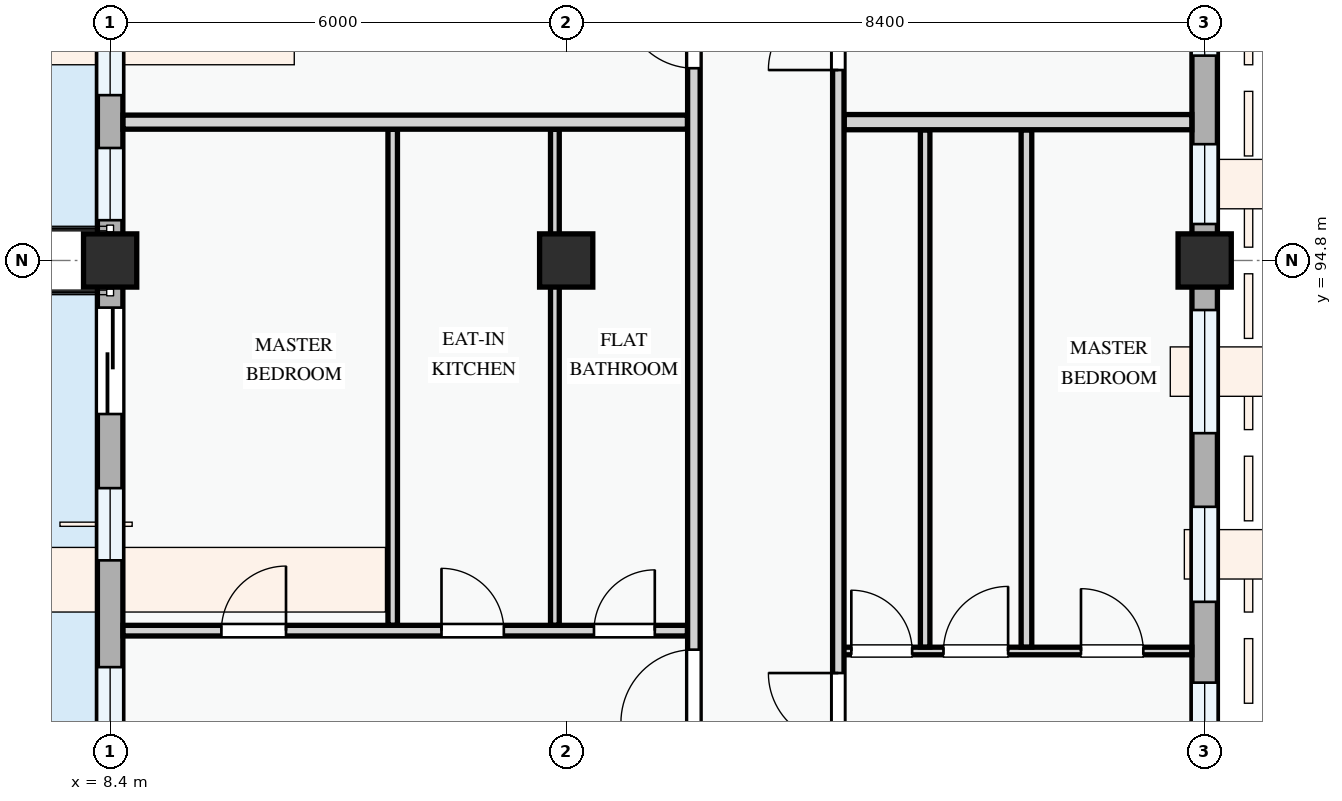
"""IFC4 building model, lengths in metres.
Left out: names, types, materials, properties, quantities, classifications, styles, units other than length and angle.
Written with IfcOpenShell. Run it as: python <this file> out.ifc"""

import sys

from ifc_helpers import new_model, si_unit, direction, frame, frame_2d, origin, origin_2d, place, context, subcontext, project, spatial, rectangle, extrude, element, fill, save


model = new_model("IFC4")
c1 = context("Model", 3, precision=1e-05, world=origin(), true_north=direction((0.0, 1.0)))
c2 = subcontext(c1, "Body", "Model", "MODEL_VIEW")
j1 = project(units=[si_unit("LENGTHUNIT", "METRE"), si_unit("PLANEANGLEUNIT", "RADIAN")], contexts=[c1])
p1 = place(None, origin())
s1 = spatial("IfcSite", under=j1, at=p1, CompositionType="ELEMENT")
p2 = place(p1, origin())
s2 = spatial("IfcBuilding", under=s1, at=p2, CompositionType="ELEMENT")
p3 = place(p2, frame((0.0, 0.0, 18.0)))
s3 = spatial("IfcBuildingStorey", under=s2, at=p3, CompositionType="ELEMENT", Elevation=18.0)
for number, where, z_axis, x_axis in (
    (1, (8.4, 94.8, 0.0), (0.0, 0.0, 1.0), (1.0, 0.0, 0.0)),
    (2, (14.4, 94.8, 0.0), (0.0, 0.0, 1.0), (1.0, 0.0, 0.0)),
    (3, (22.8, 94.8, 0.0), (0.0, 0.0, 1.0), (1.0, 0.0, 0.0)),
):
    element("IfcColumn", number, at=place(p3, frame(where, z_axis=z_axis, x_axis=x_axis)), inside=s3, PredefinedType="COLUMN", context=c2, shape_type="SweptSolid", body=[
        extrude(rectangle(XDim=0.7, YDim=0.7, at=origin_2d()), origin(), (0.0, 0.0, 1.0), 3.3),
    ])
p4 = place(p3, frame((8.4, 100.8, 0.0), z_axis=(0.0, 0.0, 1.0), x_axis=(0.0, -1.0, 0.0)))
e4 = element("IfcWall", 4, at=p4, inside=s3, PredefinedType="STANDARD", context=c2, shape_type="SweptSolid", body=[
    extrude(rectangle(XDim=6.0, YDim=0.335, at=frame_2d((3.0, 0.0))), origin(), (0.0, 0.0, 1.0), 2.575),
])
p5 = place(p4, frame((0.62, 0.0, 0.0)))
e5 = element("IfcOpeningElement", 5, at=p5, cuts=e4, PredefinedType="OPENING", context=c2, shape_type="SweptSolid", body=[
    extrude(rectangle(XDim=1.3, YDim=2.15, at=frame_2d((0.65, 1.075))), frame((0.0, 0.177, 0.0), z_axis=(0.0, -1.0, 0.0), x_axis=(1.0, 0.0, 0.0)), (0.0, 0.0, 1.0), 0.355),
])
p6 = place(p4, frame((2.325, 0.0, 0.78)))
e6 = element("IfcOpeningElement", 6, at=p6, cuts=e4, PredefinedType="OPENING", context=c2, shape_type="SweptSolid", body=[
    extrude(rectangle(XDim=1.5, YDim=1.5, at=frame_2d((0.75, 0.75))), frame((0.0, 0.177, 0.0), z_axis=(0.0, -1.0, 0.0), x_axis=(1.0, 0.0, 0.0)), (0.0, 0.0, 1.0), 0.355),
])
p7 = place(p4, frame((4.52, 0.0, 0.78)))
e7 = element("IfcOpeningElement", 7, at=p7, cuts=e4, PredefinedType="OPENING", context=c2, shape_type="SweptSolid", body=[
    extrude(rectangle(XDim=0.95, YDim=1.15, at=frame_2d((0.475, 0.575))), frame((0.0, 0.177, 0.0), z_axis=(0.0, -1.0, 0.0), x_axis=(1.0, 0.0, 0.0)), (0.0, 0.0, 1.0), 0.355),
])
p8 = place(p3, frame((8.4, 94.8, 0.0), z_axis=(0.0, 0.0, 1.0), x_axis=(0.0, -1.0, 0.0)))
e8 = element("IfcWall", 8, at=p8, inside=s3, PredefinedType="STANDARD", context=c2, shape_type="SweptSolid", body=[
    extrude(rectangle(XDim=8.4, YDim=0.335, at=frame_2d((4.2, 0.0))), origin(), (0.0, 0.0, 1.0), 2.425),
])
p9 = place(p8, frame((0.62, 0.0, 0.0)))
e9 = element("IfcOpeningElement", 9, at=p9, cuts=e8, PredefinedType="OPENING", context=c2, shape_type="SweptSolid", body=[
    extrude(rectangle(XDim=1.4, YDim=2.2, at=frame_2d((0.7, 1.1))), frame((0.0, 0.177, 0.0), z_axis=(0.0, -1.0, 0.0), x_axis=(1.0, 0.0, 0.0)), (0.0, 0.0, 1.0), 0.355),
])
p10 = place(p8, frame((2.995, 0.0, 0.78)))
e10 = element("IfcOpeningElement", 10, at=p10, cuts=e8, PredefinedType="OPENING", context=c2, shape_type="SweptSolid", body=[
    extrude(rectangle(XDim=0.95, YDim=1.15, at=frame_2d((0.475, 0.575))), frame((0.0, 0.177, 0.0), z_axis=(0.0, -1.0, 0.0), x_axis=(1.0, 0.0, 0.0)), (0.0, 0.0, 1.0), 0.355),
])
p11 = place(p8, frame((5.35, 0.0, 0.78)))
e11 = element("IfcOpeningElement", 11, at=p11, cuts=e8, PredefinedType="OPENING", context=c2, shape_type="SweptSolid", body=[
    extrude(rectangle(XDim=2.38, YDim=1.48, at=frame_2d((1.19, 0.74))), frame((0.0, 0.177, 0.0), z_axis=(0.0, -1.0, 0.0), x_axis=(1.0, 0.0, 0.0)), (0.0, 0.0, 1.0), 0.355),
])
p12 = place(p3, frame((22.8, 86.4, 0.0), z_axis=(0.0, 0.0, 1.0), x_axis=(0.0, 1.0, 0.0)))
e12 = element("IfcWall", 12, at=p12, inside=s3, PredefinedType="STANDARD", context=c2, shape_type="SweptSolid", body=[
    extrude(rectangle(XDim=8.4, YDim=0.335, at=frame_2d((4.2, 0.0))), origin(), (0.0, 0.0, 1.0), 2.425),
])
p13 = place(p12, frame((0.606, 0.0, 0.78)))
e13 = element("IfcOpeningElement", 13, at=p13, cuts=e12, PredefinedType="OPENING", context=c2, shape_type="SweptSolid", body=[
    extrude(rectangle(XDim=2.24, YDim=1.52, at=frame_2d((1.12, 0.76))), frame((0.0, 0.177, 0.0), z_axis=(0.0, -1.0, 0.0), x_axis=(1.0, 0.0, 0.0)), (0.0, 0.0, 1.0), 0.355),
])
p14 = place(p12, frame((3.909, 0.0, 0.78)))
e14 = element("IfcOpeningElement", 14, at=p14, cuts=e12, PredefinedType="OPENING", context=c2, shape_type="SweptSolid", body=[
    extrude(rectangle(XDim=1.25, YDim=1.45, at=frame_2d((0.625, 0.725))), frame((0.0, 0.177, 0.0), z_axis=(0.0, -1.0, 0.0), x_axis=(1.0, 0.0, 0.0)), (0.0, 0.0, 1.0), 0.355),
])
p15 = place(p12, frame((6.128, 0.0, 0.78)))
e15 = element("IfcOpeningElement", 15, at=p15, cuts=e12, PredefinedType="OPENING", context=c2, shape_type="SweptSolid", body=[
    extrude(rectangle(XDim=1.62, YDim=1.38, at=frame_2d((0.81, 0.69))), frame((0.0, 0.177, 0.0), z_axis=(0.0, -1.0, 0.0), x_axis=(1.0, 0.0, 0.0)), (0.0, 0.0, 1.0), 0.355),
])
p16 = place(p3, frame((22.8, 94.8, 0.0), z_axis=(0.0, 0.0, 1.0), x_axis=(0.0, 1.0, 0.0)))
e16 = element("IfcWall", 16, at=p16, inside=s3, PredefinedType="STANDARD", context=c2, shape_type="SweptSolid", body=[
    extrude(rectangle(XDim=6.0, YDim=0.335, at=frame_2d((3.0, 0.0))), origin(), (0.0, 0.0, 1.0), 2.575),
])
p17 = place(p16, frame((0.48, 0.0, 0.78)))
e17 = element("IfcOpeningElement", 17, at=p17, cuts=e16, PredefinedType="OPENING", context=c2, shape_type="SweptSolid", body=[
    extrude(rectangle(XDim=1.05, YDim=1.2, at=frame_2d((0.525, 0.6))), frame((0.0, 0.177, 0.0), z_axis=(0.0, -1.0, 0.0), x_axis=(1.0, 0.0, 0.0)), (0.0, 0.0, 1.0), 0.355),
])
p18 = place(p16, frame((2.695, 0.0, 0.78)))
e18 = element("IfcOpeningElement", 18, at=p18, cuts=e16, PredefinedType="OPENING", context=c2, shape_type="SweptSolid", body=[
    extrude(rectangle(XDim=2.24, YDim=1.52, at=frame_2d((1.12, 0.76))), frame((0.0, 0.177, 0.0), z_axis=(0.0, -1.0, 0.0), x_axis=(1.0, 0.0, 0.0)), (0.0, 0.0, 1.0), 0.355),
])
p19 = place(p3, frame((8.57, 89.93, 0.0), z_axis=(0.0, 0.0, 1.0), x_axis=(1.0, 0.0, 0.0)))
e19 = element("IfcWall", 19, at=p19, inside=s3, PredefinedType="PARTITIONING", context=c2, shape_type="SweptSolid", body=[
    extrude(rectangle(XDim=7.426, YDim=0.14, at=frame_2d((3.713, 0.0))), origin(), (0.0, 0.0, 1.0), 3.0),
])
p20 = place(p19, frame((1.294, 0.0, 0.0)))
e20 = element("IfcOpeningElement", 20, at=p20, cuts=e19, PredefinedType="OPENING", context=c2, shape_type="SweptSolid", body=[
    extrude(rectangle(XDim=0.85, YDim=2.1, at=frame_2d((0.425, 1.05))), frame((0.0, 0.08, 0.0), z_axis=(0.0, -1.0, 0.0), x_axis=(1.0, 0.0, 0.0)), (0.0, 0.0, 1.0), 0.16),
])
p21 = place(p19, frame((4.19, 0.0, 0.0)))
e21 = element("IfcOpeningElement", 21, at=p21, cuts=e19, PredefinedType="OPENING", context=c2, shape_type="SweptSolid", body=[
    extrude(rectangle(XDim=0.82, YDim=2.08, at=frame_2d((0.41, 1.04))), frame((0.0, 0.08, 0.0), z_axis=(0.0, -1.0, 0.0), x_axis=(1.0, 0.0, 0.0)), (0.0, 0.0, 1.0), 0.16),
])
p22 = place(p19, frame((6.196, 0.0, 0.0)))
e22 = element("IfcOpeningElement", 22, at=p22, cuts=e19, PredefinedType="OPENING", context=c2, shape_type="SweptSolid", body=[
    extrude(rectangle(XDim=0.8, YDim=2.1, at=frame_2d((0.4, 1.05))), frame((0.0, 0.08, 0.0), z_axis=(0.0, -1.0, 0.0), x_axis=(1.0, 0.0, 0.0)), (0.0, 0.0, 1.0), 0.16),
])
p23 = place(p3, frame((12.118, 90.002, 0.0), z_axis=(0.0, 0.0, 1.0), x_axis=(0.0, 1.0, 0.0)))
e23 = element("IfcWall", 23, at=p23, inside=s3, PredefinedType="PARTITIONING", context=c2, shape_type="SweptSolid", body=[
    extrude(rectangle(XDim=6.523, YDim=0.125, at=frame_2d((3.262, 0.0))), origin(), (0.0, 0.0, 1.0), 3.0),
])
p24 = place(p3, frame((14.251, 90.002, 0.0), z_axis=(0.0, 0.0, 1.0), x_axis=(0.0, 1.0, 0.0)))
e24 = element("IfcWall", 24, at=p24, inside=s3, PredefinedType="PARTITIONING", context=c2, shape_type="SweptSolid", body=[
    extrude(rectangle(XDim=6.523, YDim=0.115, at=frame_2d((3.262, 0.0))), origin(), (0.0, 0.0, 1.0), 2.425),
])
p25 = place(p3, frame((17.98, 89.662, 0.0), z_axis=(0.0, 0.0, 1.0), x_axis=(1.0, 0.0, 0.0)))
e25 = element("IfcWall", 25, at=p25, inside=s3, PredefinedType="PARTITIONING", context=c2, shape_type="SweptSolid", body=[
    extrude(rectangle(XDim=4.651, YDim=0.1, at=frame_2d((2.325, 0.0))), origin(), (0.0, 0.0, 1.0), 3.0),
])
p26 = place(p25, frame((0.171, 0.0, 0.0)))
e26 = element("IfcOpeningElement", 26, at=p26, cuts=e25, PredefinedType="OPENING", context=c2, shape_type="SweptSolid", body=[
    extrude(rectangle(XDim=0.8, YDim=2.1, at=frame_2d((0.4, 1.05))), frame((0.0, 0.06, 0.0), z_axis=(0.0, -1.0, 0.0), x_axis=(1.0, 0.0, 0.0)), (0.0, 0.0, 1.0), 0.12),
])
p27 = place(p25, frame((1.384, 0.0, 0.0)))
e27 = element("IfcOpeningElement", 27, at=p27, cuts=e25, PredefinedType="OPENING", context=c2, shape_type="SweptSolid", body=[
    extrude(rectangle(XDim=0.85, YDim=2.1, at=frame_2d((0.425, 1.05))), frame((0.0, 0.06, 0.0), z_axis=(0.0, -1.0, 0.0), x_axis=(1.0, 0.0, 0.0)), (0.0, 0.0, 1.0), 0.12),
])
p28 = place(p25, frame((3.193, 0.0, 0.0)))
e28 = element("IfcOpeningElement", 28, at=p28, cuts=e25, PredefinedType="OPENING", context=c2, shape_type="SweptSolid", body=[
    extrude(rectangle(XDim=0.82, YDim=2.08, at=frame_2d((0.41, 1.04))), frame((0.0, 0.06, 0.0), z_axis=(0.0, -1.0, 0.0), x_axis=(1.0, 0.0, 0.0)), (0.0, 0.0, 1.0), 0.12),
])
p29 = place(p3, frame((20.455, 89.714, 0.0), z_axis=(0.0, 0.0, 1.0), x_axis=(0.0, 1.0, 0.0)))
e29 = element("IfcWall", 29, at=p29, inside=s3, PredefinedType="PARTITIONING", context=c2, shape_type="SweptSolid", body=[
    extrude(rectangle(XDim=6.804, YDim=0.14, at=frame_2d((3.402, 0.0))), origin(), (0.0, 0.0, 1.0), 3.0),
])
p30 = place(p3, frame((19.122, 89.714, 0.0), z_axis=(0.0, 0.0, 1.0), x_axis=(0.0, 1.0, 0.0)))
e30 = element("IfcWall", 30, at=p30, inside=s3, PredefinedType="PARTITIONING", context=c2, shape_type="SweptSolid", body=[
    extrude(rectangle(XDim=6.804, YDim=0.125, at=frame_2d((3.402, 0.0))), origin(), (0.0, 0.0, 1.0), 3.0),
])
p31 = place(p3, frame((8.57, 96.62, 0.0), z_axis=(0.0, 0.0, 1.0), x_axis=(1.0, 0.0, 0.0)))
e31 = element("IfcWall", 31, at=p31, inside=s3, PredefinedType="PARTITIONING", context=c2, shape_type="SweptSolid", body=[
    extrude(rectangle(XDim=7.426, YDim=0.185, at=frame_2d((3.713, 0.0))), origin(), (0.0, 0.0, 1.0), 3.0),
])
p32 = place(p3, frame((18.057, 96.62, 0.0), z_axis=(0.0, 0.0, 1.0), x_axis=(1.0, 0.0, 0.0)))
e32 = element("IfcWall", 32, at=p32, inside=s3, PredefinedType="PARTITIONING", context=c2, shape_type="SweptSolid", body=[
    extrude(rectangle(XDim=4.574, YDim=0.2, at=frame_2d((2.287, 0.0))), origin(), (0.0, 0.0, 1.0), 3.0),
])
p33 = place(p3, frame((16.08, 72.06, 0.0), z_axis=(0.0, 0.0, 1.0), x_axis=(0.0, 1.0, 0.0)))
e33 = element("IfcWall", 33, at=p33, inside=s3, PredefinedType="PARTITIONING", context=c2, shape_type="SweptSolid", body=[
    extrude(rectangle(XDim=37.28, YDim=0.165, at=frame_2d((18.64, 0.0))), origin(), (0.0, 0.0, 1.0), 3.0),
])
p34 = place(p33, frame((3.606, 0.0, 0.0)))
e34 = element("IfcOpeningElement", 34, at=p34, cuts=e33, PredefinedType="OPENING", context=c2, shape_type="SweptSolid", body=[
    extrude(rectangle(XDim=0.92, YDim=2.1, at=frame_2d((0.46, 1.05))), frame((0.0, 0.093, 0.0), z_axis=(0.0, -1.0, 0.0), x_axis=(1.0, 0.0, 0.0)), (0.0, 0.0, 1.0), 0.185),
])
p35 = place(p33, frame((16.66, 0.0, 0.0)))
e35 = element("IfcOpeningElement", 35, at=p35, cuts=e33, PredefinedType="OPENING", context=c2, shape_type="SweptSolid", body=[
    extrude(rectangle(XDim=0.96, YDim=2.12, at=frame_2d((0.48, 1.06))), frame((0.0, 0.093, 0.0), z_axis=(0.0, -1.0, 0.0), x_axis=(1.0, 0.0, 0.0)), (0.0, 0.0, 1.0), 0.185),
])
p36 = place(p33, frame((25.269, 0.0, 0.0)))
e36 = element("IfcOpeningElement", 36, at=p36, cuts=e33, PredefinedType="OPENING", context=c2, shape_type="SweptSolid", body=[
    extrude(rectangle(XDim=0.92, YDim=2.1, at=frame_2d((0.46, 1.05))), frame((0.0, 0.093, 0.0), z_axis=(0.0, -1.0, 0.0), x_axis=(1.0, 0.0, 0.0)), (0.0, 0.0, 1.0), 0.185),
])
p37 = place(p3, frame((17.98, 72.06, 0.0), z_axis=(0.0, 0.0, 1.0), x_axis=(0.0, 1.0, 0.0)))
e37 = element("IfcWall", 37, at=p37, inside=s3, PredefinedType="PARTITIONING", context=c2, shape_type="SweptSolid", body=[
    extrude(rectangle(XDim=37.28, YDim=0.15, at=frame_2d((18.64, 0.0))), origin(), (0.0, 0.0, 1.0), 3.0),
])
p38 = place(p37, frame((3.668, 0.0, 0.0)))
e38 = element("IfcOpeningElement", 38, at=p38, cuts=e37, PredefinedType="OPENING", context=c2, shape_type="SweptSolid", body=[
    extrude(rectangle(XDim=0.92, YDim=2.1, at=frame_2d((0.46, 1.05))), frame((0.0, 0.085, 0.0), z_axis=(0.0, -1.0, 0.0), x_axis=(1.0, 0.0, 0.0)), (0.0, 0.0, 1.0), 0.17),
])
p39 = place(p37, frame((16.392, 0.0, 0.0)))
e39 = element("IfcOpeningElement", 39, at=p39, cuts=e37, PredefinedType="OPENING", context=c2, shape_type="SweptSolid", body=[
    extrude(rectangle(XDim=0.92, YDim=2.1, at=frame_2d((0.46, 1.05))), frame((0.0, 0.085, 0.0), z_axis=(0.0, -1.0, 0.0), x_axis=(1.0, 0.0, 0.0)), (0.0, 0.0, 1.0), 0.17),
])
p40 = place(p37, frame((25.246, 0.0, 0.0)))
e40 = element("IfcOpeningElement", 40, at=p40, cuts=e37, PredefinedType="OPENING", context=c2, shape_type="SweptSolid", body=[
    extrude(rectangle(XDim=0.92, YDim=2.1, at=frame_2d((0.46, 1.05))), frame((0.0, 0.085, 0.0), z_axis=(0.0, -1.0, 0.0), x_axis=(1.0, 0.0, 0.0)), (0.0, 0.0, 1.0), 0.17),
])
p41 = place(p6, origin())
e41 = element("IfcWindow", 41, at=p41, inside=s3, PartitioningType="SINGLE_PANEL", PredefinedType="WINDOW", context=c2, shape_type="SweptSolid", body=[
    extrude(rectangle(XDim=1.5, YDim=1.5, at=frame_2d((0.75, 0.75))), frame((0.0, 0.03, 0.0), z_axis=(0.0, -1.0, 0.0), x_axis=(1.0, 0.0, 0.0)), (0.0, 0.0, 1.0), 0.06),
])
fill(e6, e41)
p42 = place(p7, origin())
e42 = element("IfcWindow", 42, at=p42, inside=s3, PartitioningType="SINGLE_PANEL", PredefinedType="WINDOW", context=c2, shape_type="SweptSolid", body=[
    extrude(rectangle(XDim=0.95, YDim=1.15, at=frame_2d((0.475, 0.575))), frame((0.0, 0.03, 0.0), z_axis=(0.0, -1.0, 0.0), x_axis=(1.0, 0.0, 0.0)), (0.0, 0.0, 1.0), 0.06),
])
fill(e7, e42)
p43 = place(p9, frame((1.4, 0.0, 0.0), z_axis=(0.0, 0.0, 1.0), x_axis=(-1.0, 0.0, 0.0)))
e43 = element("IfcDoor", 43, at=p43, inside=s3, OperationType="SLIDING_TO_LEFT", PredefinedType="DOOR", context=c2, shape_type="SweptSolid", body=[
    extrude(rectangle(XDim=1.4, YDim=2.2, at=frame_2d((0.7, 1.1))), frame((0.0, 0.025, 0.0), z_axis=(0.0, -1.0, 0.0), x_axis=(1.0, 0.0, 0.0)), (0.0, 0.0, 1.0), 0.05),
])
fill(e9, e43)
p44 = place(p10, origin())
e44 = element("IfcWindow", 44, at=p44, inside=s3, PartitioningType="SINGLE_PANEL", PredefinedType="WINDOW", context=c2, shape_type="SweptSolid", body=[
    extrude(rectangle(XDim=0.95, YDim=1.15, at=frame_2d((0.475, 0.575))), frame((0.0, 0.03, 0.0), z_axis=(0.0, -1.0, 0.0), x_axis=(1.0, 0.0, 0.0)), (0.0, 0.0, 1.0), 0.06),
])
fill(e10, e44)
p45 = place(p11, origin())
e45 = element("IfcWindow", 45, at=p45, inside=s3, PartitioningType="DOUBLE_PANEL_VERTICAL", PredefinedType="WINDOW", context=c2, shape_type="SweptSolid", body=[
    extrude(rectangle(XDim=2.38, YDim=1.48, at=frame_2d((1.19, 0.74))), frame((0.0, 0.03, 0.0), z_axis=(0.0, -1.0, 0.0), x_axis=(1.0, 0.0, 0.0)), (0.0, 0.0, 1.0), 0.06),
])
fill(e11, e45)
p46 = place(p13, origin())
e46 = element("IfcWindow", 46, at=p46, inside=s3, PartitioningType="DOUBLE_PANEL_VERTICAL", PredefinedType="WINDOW", context=c2, shape_type="SweptSolid", body=[
    extrude(rectangle(XDim=2.24, YDim=1.52, at=frame_2d((1.12, 0.76))), frame((0.0, 0.03, 0.0), z_axis=(0.0, -1.0, 0.0), x_axis=(1.0, 0.0, 0.0)), (0.0, 0.0, 1.0), 0.06),
])
fill(e13, e46)
p47 = place(p14, origin())
e47 = element("IfcWindow", 47, at=p47, inside=s3, PartitioningType="SINGLE_PANEL", PredefinedType="WINDOW", context=c2, shape_type="SweptSolid", body=[
    extrude(rectangle(XDim=1.25, YDim=1.45, at=frame_2d((0.625, 0.725))), frame((0.0, 0.03, 0.0), z_axis=(0.0, -1.0, 0.0), x_axis=(1.0, 0.0, 0.0)), (0.0, 0.0, 1.0), 0.06),
])
fill(e14, e47)
p48 = place(p15, origin())
e48 = element("IfcWindow", 48, at=p48, inside=s3, PartitioningType="DOUBLE_PANEL_VERTICAL", PredefinedType="WINDOW", context=c2, shape_type="SweptSolid", body=[
    extrude(rectangle(XDim=1.62, YDim=1.38, at=frame_2d((0.81, 0.69))), frame((0.0, 0.03, 0.0), z_axis=(0.0, -1.0, 0.0), x_axis=(1.0, 0.0, 0.0)), (0.0, 0.0, 1.0), 0.06),
])
fill(e15, e48)
p49 = place(p17, origin())
e49 = element("IfcWindow", 49, at=p49, inside=s3, PartitioningType="SINGLE_PANEL", PredefinedType="WINDOW", context=c2, shape_type="SweptSolid", body=[
    extrude(rectangle(XDim=1.05, YDim=1.2, at=frame_2d((0.525, 0.6))), frame((0.0, 0.03, 0.0), z_axis=(0.0, -1.0, 0.0), x_axis=(1.0, 0.0, 0.0)), (0.0, 0.0, 1.0), 0.06),
])
fill(e17, e49)
p50 = place(p18, origin())
e50 = element("IfcWindow", 50, at=p50, inside=s3, PartitioningType="DOUBLE_PANEL_VERTICAL", PredefinedType="WINDOW", context=c2, shape_type="SweptSolid", body=[
    extrude(rectangle(XDim=2.24, YDim=1.52, at=frame_2d((1.12, 0.76))), frame((0.0, 0.03, 0.0), z_axis=(0.0, -1.0, 0.0), x_axis=(1.0, 0.0, 0.0)), (0.0, 0.0, 1.0), 0.06),
])
fill(e18, e50)
p51 = place(p20, origin())
e51 = element("IfcDoor", 51, at=p51, inside=s3, OperationType="SINGLE_SWING_RIGHT", PredefinedType="DOOR", context=c2, shape_type="SweptSolid", body=[
    extrude(rectangle(XDim=0.85, YDim=2.1, at=frame_2d((0.425, 1.05))), frame((0.0, 0.025, 0.0), z_axis=(0.0, -1.0, 0.0), x_axis=(1.0, 0.0, 0.0)), (0.0, 0.0, 1.0), 0.05),
])
fill(e20, e51)
p52 = place(p21, origin())
e52 = element("IfcDoor", 52, at=p52, inside=s3, OperationType="SINGLE_SWING_LEFT", PredefinedType="DOOR", context=c2, shape_type="SweptSolid", body=[
    extrude(rectangle(XDim=0.82, YDim=2.08, at=frame_2d((0.41, 1.04))), frame((0.0, 0.025, 0.0), z_axis=(0.0, -1.0, 0.0), x_axis=(1.0, 0.0, 0.0)), (0.0, 0.0, 1.0), 0.05),
])
fill(e21, e52)
p53 = place(p22, origin())
e53 = element("IfcDoor", 53, at=p53, inside=s3, OperationType="SINGLE_SWING_RIGHT", PredefinedType="DOOR", context=c2, shape_type="SweptSolid", body=[
    extrude(rectangle(XDim=0.8, YDim=2.1, at=frame_2d((0.4, 1.05))), frame((0.0, 0.025, 0.0), z_axis=(0.0, -1.0, 0.0), x_axis=(1.0, 0.0, 0.0)), (0.0, 0.0, 1.0), 0.05),
])
fill(e22, e53)
p54 = place(p26, origin())
e54 = element("IfcDoor", 54, at=p54, inside=s3, OperationType="SINGLE_SWING_LEFT", PredefinedType="DOOR", context=c2, shape_type="SweptSolid", body=[
    extrude(rectangle(XDim=0.8, YDim=2.1, at=frame_2d((0.4, 1.05))), frame((0.0, 0.025, 0.0), z_axis=(0.0, -1.0, 0.0), x_axis=(1.0, 0.0, 0.0)), (0.0, 0.0, 1.0), 0.05),
])
fill(e26, e54)
p55 = place(p27, origin())
e55 = element("IfcDoor", 55, at=p55, inside=s3, OperationType="SINGLE_SWING_RIGHT", PredefinedType="DOOR", context=c2, shape_type="SweptSolid", body=[
    extrude(rectangle(XDim=0.85, YDim=2.1, at=frame_2d((0.425, 1.05))), frame((0.0, 0.025, 0.0), z_axis=(0.0, -1.0, 0.0), x_axis=(1.0, 0.0, 0.0)), (0.0, 0.0, 1.0), 0.05),
])
fill(e27, e55)
p56 = place(p28, origin())
e56 = element("IfcDoor", 56, at=p56, inside=s3, OperationType="SINGLE_SWING_LEFT", PredefinedType="DOOR", context=c2, shape_type="SweptSolid", body=[
    extrude(rectangle(XDim=0.82, YDim=2.08, at=frame_2d((0.41, 1.04))), frame((0.0, 0.025, 0.0), z_axis=(0.0, -1.0, 0.0), x_axis=(1.0, 0.0, 0.0)), (0.0, 0.0, 1.0), 0.05),
])
fill(e28, e56)
p57 = place(p35, origin())
e57 = element("IfcDoor", 57, at=p57, inside=s3, OperationType="SINGLE_SWING_LEFT", PredefinedType="DOOR", context=c2, shape_type="SweptSolid", body=[
    extrude(rectangle(XDim=0.96, YDim=2.12, at=frame_2d((0.48, 1.06))), frame((0.0, 0.025, 0.0), z_axis=(0.0, -1.0, 0.0), x_axis=(1.0, 0.0, 0.0)), (0.0, 0.0, 1.0), 0.05),
])
fill(e35, e57)
p58 = place(p36, origin())
e58 = element("IfcDoor", 58, at=p58, inside=s3, OperationType="SINGLE_SWING_RIGHT", PredefinedType="DOOR", context=c2, shape_type="SweptSolid", body=[
    extrude(rectangle(XDim=0.92, YDim=2.1, at=frame_2d((0.46, 1.05))), frame((0.0, 0.025, 0.0), z_axis=(0.0, -1.0, 0.0), x_axis=(1.0, 0.0, 0.0)), (0.0, 0.0, 1.0), 0.05),
])
fill(e36, e58)
p59 = place(p39, origin())
e59 = element("IfcDoor", 59, at=p59, inside=s3, OperationType="SINGLE_SWING_RIGHT", PredefinedType="DOOR", context=c2, shape_type="SweptSolid", body=[
    extrude(rectangle(XDim=0.92, YDim=2.1, at=frame_2d((0.46, 1.05))), frame((0.0, 0.025, 0.0), z_axis=(0.0, -1.0, 0.0), x_axis=(1.0, 0.0, 0.0)), (0.0, 0.0, 1.0), 0.05),
])
fill(e39, e59)
p60 = place(p40, origin())
e60 = element("IfcDoor", 60, at=p60, inside=s3, OperationType="SINGLE_SWING_LEFT", PredefinedType="DOOR", context=c2, shape_type="SweptSolid", body=[
    extrude(rectangle(XDim=0.92, YDim=2.1, at=frame_2d((0.46, 1.05))), frame((0.0, 0.025, 0.0), z_axis=(0.0, -1.0, 0.0), x_axis=(1.0, 0.0, 0.0)), (0.0, 0.0, 1.0), 0.05),
])
fill(e40, e60)
save(model, sys.argv[1])
